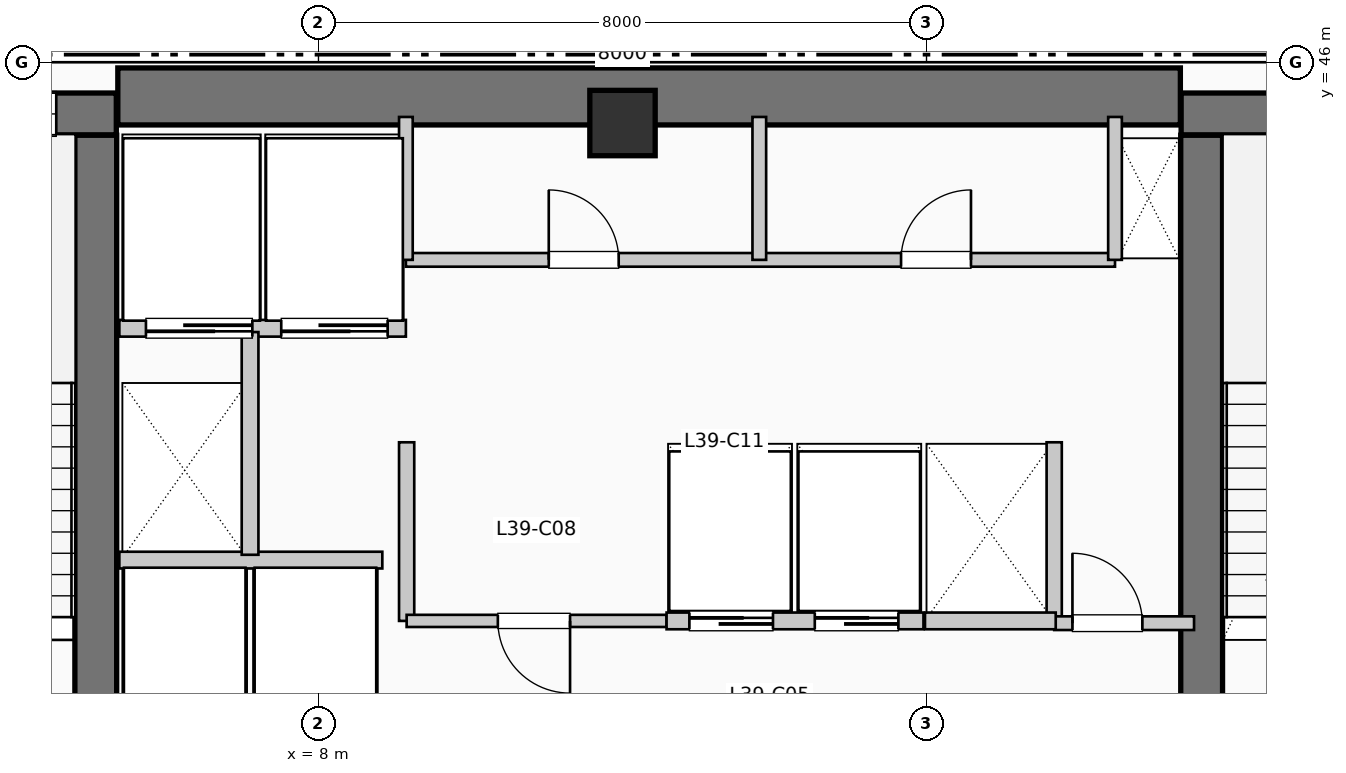
"""IFC4 building model, lengths in metres.
Left out: names, types, materials, properties, quantities, classifications, styles, units other than length and angle.
Written with IfcOpenShell. Run it as: python <this file> out.ifc"""

import sys

from ifc_helpers import new_model, si_unit, direction, frame, frame_2d, origin, origin_2d, place, context, subcontext, project, spatial, rectangle, extrude, element, fill, save


model = new_model("IFC4")
c1 = context("Model", 3, precision=1e-05, world=origin(), true_north=direction((0.0, 1.0)))
c2 = subcontext(c1, "Body", "Model", "MODEL_VIEW")
j1 = project(units=[si_unit("LENGTHUNIT", "METRE"), si_unit("PLANEANGLEUNIT", "RADIAN")], contexts=[c1])
p1 = place(None, origin())
s1 = spatial("IfcSite", under=j1, at=p1, CompositionType="ELEMENT")
p2 = place(p1, origin())
s2 = spatial("IfcBuilding", under=s1, at=p2, CompositionType="ELEMENT")
p3 = place(p2, frame((0.0, 0.0, 162.69)))
s3 = spatial("IfcBuildingStorey", under=s2, at=p3, CompositionType="ELEMENT", Elevation=162.69)
p4 = place(p3, frame((5.36, 45.55, 0.0), z_axis=(0.0, 0.0, 1.0), x_axis=(1.0, 0.0, 0.0)))
e1 = element("IfcWall", 1, at=p4, inside=s3, PredefinedType="SHEAR", context=c2, shape_type="SweptSolid", body=[
    extrude(rectangle(XDim=13.98, YDim=0.75, at=frame_2d((6.99, 0.0))), origin(), (0.0, 0.0, 1.0), 3.96),
])
p5 = place(p3, frame((5.07, 37.15, 0.0), z_axis=(0.0, 0.0, 1.0), x_axis=(0.0, 1.0, 0.0)))
e2 = element("IfcWall", 2, at=p5, inside=s3, PredefinedType="SHEAR", context=c2, shape_type="SweptSolid", body=[
    extrude(rectangle(XDim=7.89, YDim=0.55, at=frame_2d((3.945, 0.0))), origin(), (0.0, 0.0, 1.0), 3.96),
])
p6 = place(p3, frame((1.1, 45.32, 0.0), z_axis=(0.0, 0.0, 1.0), x_axis=(1.0, 0.0, 0.0)))
e3 = element("IfcWall", 3, at=p6, inside=s3, PredefinedType="SHEAR", context=c2, shape_type="SweptSolid", body=[
    extrude(rectangle(XDim=4.24, YDim=0.55, at=frame_2d((2.12, 0.0))), origin(), (0.0, 0.0, 1.0), 3.96),
])
p7 = place(p6, frame((2.05, 0.0, 1.05)))
e4 = element("IfcOpeningElement", 4, at=p7, cuts=e3, PredefinedType="OPENING", context=c2, shape_type="SweptSolid", body=[
    extrude(rectangle(XDim=1.4, YDim=1.8, at=frame_2d((0.7, 0.9))), frame((0.0, 0.285, 0.0), z_axis=(0.0, -1.0, 0.0), x_axis=(1.0, 0.0, 0.0)), (0.0, 0.0, 1.0), 0.57),
])
p8 = place(p3, frame((19.62, 37.15, 0.0), z_axis=(0.0, 0.0, 1.0), x_axis=(0.0, 1.0, 0.0)))
e5 = element("IfcWall", 5, at=p8, inside=s3, PredefinedType="SHEAR", context=c2, shape_type="SweptSolid", body=[
    extrude(rectangle(XDim=7.89, YDim=0.55, at=frame_2d((3.945, 0.0))), origin(), (0.0, 0.0, 1.0), 3.96),
])
p9 = place(p3, frame((19.35, 45.32, 0.0), z_axis=(0.0, 0.0, 1.0), x_axis=(1.0, 0.0, 0.0)))
e6 = element("IfcWall", 6, at=p9, inside=s3, PredefinedType="SHEAR", context=c2, shape_type="SweptSolid", body=[
    extrude(rectangle(XDim=3.69, YDim=0.55, at=frame_2d((1.845, 0.0))), origin(), (0.0, 0.0, 1.0), 3.96),
])
p10 = place(p9, frame((1.15, 0.0, 1.05)))
e7 = element("IfcOpeningElement", 7, at=p10, cuts=e6, PredefinedType="OPENING", context=c2, shape_type="SweptSolid", body=[
    extrude(rectangle(XDim=1.4, YDim=1.8, at=frame_2d((0.7, 0.9))), frame((0.0, 0.285, 0.0), z_axis=(0.0, -1.0, 0.0), x_axis=(1.0, 0.0, 0.0)), (0.0, 0.0, 1.0), 0.57),
])
p11 = place(p3, frame((12.0, 45.2, 0.0), z_axis=(0.0, 0.0, 1.0), x_axis=(1.0, 0.0, 0.0)))
e8 = element("IfcColumn", 8, at=p11, inside=s3, PredefinedType="COLUMN", context=c2, shape_type="SweptSolid", body=[
    extrude(rectangle(XDim=0.86, YDim=0.86, at=origin_2d()), origin(), (0.0, 0.0, 1.0), 3.96),
])
p12 = place(p3, frame((5.38, 39.45, 0.0), z_axis=(0.0, 0.0, 1.0), x_axis=(1.0, 0.0, 0.0)))
e9 = element("IfcWall", 9, at=p12, inside=s3, PredefinedType="PARTITIONING", context=c2, shape_type="SweptSolid", body=[
    extrude(rectangle(XDim=3.46, YDim=0.22, at=frame_2d((1.73, 0.0))), origin(), (0.0, 0.0, 1.0), 3.71),
])
p13 = place(p3, frame((5.38, 42.5, 0.0), z_axis=(0.0, 0.0, 1.0), x_axis=(1.0, 0.0, 0.0)))
e10 = element("IfcWall", 10, at=p13, inside=s3, PredefinedType="PARTITIONING", context=c2, shape_type="SweptSolid", body=[
    extrude(rectangle(XDim=3.77, YDim=0.22, at=frame_2d((1.885, 0.0))), origin(), (0.0, 0.0, 1.0), 3.71),
])
p14 = place(p13, frame((1.75, 0.0, 0.0), z_axis=(0.0, 0.0, 1.0), x_axis=(-1.0, 0.0, 0.0)))
e11 = element("IfcOpeningElement", 11, at=p14, cuts=e10, PredefinedType="OPENING", context=c2, shape_type="SweptSolid", body=[
    extrude(rectangle(XDim=1.4, YDim=2.2, at=frame_2d((0.7, 1.1))), frame((0.0, 0.12, 0.0), z_axis=(0.0, -1.0, 0.0), x_axis=(1.0, 0.0, 0.0)), (0.0, 0.0, 1.0), 0.24),
])
p15 = place(p13, frame((3.53, 0.0, 0.0), z_axis=(0.0, 0.0, 1.0), x_axis=(-1.0, 0.0, 0.0)))
e12 = element("IfcOpeningElement", 12, at=p15, cuts=e10, PredefinedType="OPENING", context=c2, shape_type="SweptSolid", body=[
    extrude(rectangle(XDim=1.4, YDim=2.2, at=frame_2d((0.7, 1.1))), frame((0.0, 0.12, 0.0), z_axis=(0.0, -1.0, 0.0), x_axis=(1.0, 0.0, 0.0)), (0.0, 0.0, 1.0), 0.24),
])
p16 = place(p3, frame((7.1, 39.52, 0.0), z_axis=(0.0, 0.0, 1.0), x_axis=(0.0, 1.0, 0.0)))
e13 = element("IfcWall", 13, at=p16, inside=s3, PredefinedType="PARTITIONING", context=c2, shape_type="SweptSolid", body=[
    extrude(rectangle(XDim=2.93, YDim=0.22, at=frame_2d((1.465, 0.0))), origin(), (0.0, 0.0, 1.0), 3.71),
])
for number, where, z_axis, x_axis in (
    (14, (9.16, 38.65, 0.0), (0.0, 0.0, 1.0), (0.0, 1.0, 0.0)),
    (15, (17.68, 38.65, 0.0), (0.0, 0.0, 1.0), (0.0, 1.0, 0.0)),
):
    element("IfcWall", number, at=place(p3, frame(where, z_axis=z_axis, x_axis=x_axis)), inside=s3, PredefinedType="PARTITIONING", context=c2, shape_type="SweptSolid", body=[
        extrude(rectangle(XDim=2.35, YDim=0.2, at=frame_2d((1.175, 0.0))), origin(), (0.0, 0.0, 1.0), 3.71),
    ])
p17 = place(p3, frame((17.68, 38.62, 0.0), z_axis=(0.0, 0.0, 1.0), x_axis=(1.0, 0.0, 0.0)))
e16 = element("IfcWall", 16, at=p17, inside=s3, PredefinedType="PARTITIONING", context=c2, shape_type="SweptSolid", body=[
    extrude(rectangle(XDim=1.84, YDim=0.18, at=frame_2d((0.92, 0.0))), origin(), (0.0, 0.0, 1.0), 3.71),
])
p18 = place(p17, frame((0.24, 0.0, 0.0)))
e17 = element("IfcOpeningElement", 17, at=p18, cuts=e16, PredefinedType="OPENING", context=c2, shape_type="SweptSolid", body=[
    extrude(rectangle(XDim=0.92, YDim=2.1, at=frame_2d((0.46, 1.05))), frame((0.0, 0.1, 0.0), z_axis=(0.0, -1.0, 0.0), x_axis=(1.0, 0.0, 0.0)), (0.0, 0.0, 1.0), 0.2),
])
p19 = place(p3, frame((9.16, 38.65, 0.0), z_axis=(0.0, 0.0, 1.0), x_axis=(1.0, 0.0, 0.0)))
e18 = element("IfcWall", 18, at=p19, inside=s3, PredefinedType="PARTITIONING", context=c2, shape_type="SweptSolid", body=[
    extrude(rectangle(XDim=3.42, YDim=0.16, at=frame_2d((1.71, 0.0))), origin(), (0.0, 0.0, 1.0), 3.71),
])
p20 = place(p19, frame((2.15, 0.0, 0.0), z_axis=(0.0, 0.0, 1.0), x_axis=(-1.0, 0.0, 0.0)))
e19 = element("IfcOpeningElement", 19, at=p20, cuts=e18, PredefinedType="OPENING", context=c2, shape_type="SweptSolid", body=[
    extrude(rectangle(XDim=0.95, YDim=2.15, at=frame_2d((0.475, 1.075))), frame((0.0, 0.09, 0.0), z_axis=(0.0, -1.0, 0.0), x_axis=(1.0, 0.0, 0.0)), (0.0, 0.0, 1.0), 0.18),
])
p21 = place(p3, frame((12.58, 38.65, 0.0), z_axis=(0.0, 0.0, 1.0), x_axis=(1.0, 0.0, 0.0)))
e20 = element("IfcWall", 20, at=p21, inside=s3, PredefinedType="PARTITIONING", context=c2, shape_type="SweptSolid", body=[
    extrude(rectangle(XDim=3.38, YDim=0.22, at=frame_2d((1.69, 0.0))), origin(), (0.0, 0.0, 1.0), 3.71),
])
p22 = place(p21, frame((0.3, 0.0, 0.0)))
e21 = element("IfcOpeningElement", 21, at=p22, cuts=e20, PredefinedType="OPENING", context=c2, shape_type="SweptSolid", body=[
    extrude(rectangle(XDim=1.1, YDim=2.2, at=frame_2d((0.55, 1.1))), frame((0.0, 0.12, 0.0), z_axis=(0.0, -1.0, 0.0), x_axis=(1.0, 0.0, 0.0)), (0.0, 0.0, 1.0), 0.24),
])
p23 = place(p21, frame((1.95, 0.0, 0.0)))
e22 = element("IfcOpeningElement", 22, at=p23, cuts=e20, PredefinedType="OPENING", context=c2, shape_type="SweptSolid", body=[
    extrude(rectangle(XDim=1.1, YDim=2.2, at=frame_2d((0.55, 1.1))), frame((0.0, 0.12, 0.0), z_axis=(0.0, -1.0, 0.0), x_axis=(1.0, 0.0, 0.0)), (0.0, 0.0, 1.0), 0.24),
])
p24 = place(p3, frame((15.98, 38.65, 0.0), z_axis=(0.0, 0.0, 1.0), x_axis=(1.0, 0.0, 0.0)))
e23 = element("IfcWall", 23, at=p24, inside=s3, PredefinedType="PARTITIONING", context=c2, shape_type="SweptSolid", body=[
    extrude(rectangle(XDim=1.72, YDim=0.22, at=frame_2d((0.86, 0.0))), origin(), (0.0, 0.0, 1.0), 3.71),
])
p25 = place(p3, frame((9.15, 43.4, 0.0), z_axis=(0.0, 0.0, 1.0), x_axis=(1.0, 0.0, 0.0)))
e24 = element("IfcWall", 24, at=p25, inside=s3, PredefinedType="PLUMBINGWALL", context=c2, shape_type="SweptSolid", body=[
    extrude(rectangle(XDim=9.33, YDim=0.18, at=frame_2d((4.665, 0.0))), origin(), (0.0, 0.0, 1.0), 3.71),
])
p26 = place(p25, frame((1.88, 0.0, 0.0)))
e25 = element("IfcOpeningElement", 25, at=p26, cuts=e24, PredefinedType="OPENING", context=c2, shape_type="SweptSolid", body=[
    extrude(rectangle(XDim=0.92, YDim=2.1, at=frame_2d((0.46, 1.05))), frame((0.0, 0.1, 0.0), z_axis=(0.0, -1.0, 0.0), x_axis=(1.0, 0.0, 0.0)), (0.0, 0.0, 1.0), 0.2),
])
p27 = place(p25, frame((6.515, 0.0, 0.0)))
e26 = element("IfcOpeningElement", 26, at=p27, cuts=e24, PredefinedType="OPENING", context=c2, shape_type="SweptSolid", body=[
    extrude(rectangle(XDim=0.92, YDim=2.1, at=frame_2d((0.46, 1.05))), frame((0.0, 0.1, 0.0), z_axis=(0.0, -1.0, 0.0), x_axis=(1.0, 0.0, 0.0)), (0.0, 0.0, 1.0), 0.2),
])
for number, where, z_axis, x_axis in (
    (27, (9.15, 43.4, 0.0), (0.0, 0.0, 1.0), (0.0, 1.0, 0.0)),
    (28, (18.48, 43.4, 0.0), (0.0, 0.0, 1.0), (0.0, 1.0, 0.0)),
    (29, (13.8, 43.4, 0.0), (0.0, 0.0, 1.0), (0.0, 1.0, 0.0)),
):
    element("IfcWall", number, at=place(p3, frame(where, z_axis=z_axis, x_axis=x_axis)), inside=s3, PredefinedType="PLUMBINGWALL", context=c2, shape_type="SweptSolid", body=[
        extrude(rectangle(XDim=1.88, YDim=0.18, at=frame_2d((0.94, 0.0))), origin(), (0.0, 0.0, 1.0), 3.71),
    ])
p28 = place(p7, origin())
e30 = element("IfcWindow", 30, at=p28, inside=s3, PartitioningType="SINGLE_PANEL", PredefinedType="WINDOW", context=c2, shape_type="SweptSolid", body=[
    extrude(rectangle(XDim=1.4, YDim=1.8, at=frame_2d((0.7, 0.9))), frame((0.0, 0.03, 0.0), z_axis=(0.0, -1.0, 0.0), x_axis=(1.0, 0.0, 0.0)), (0.0, 0.0, 1.0), 0.06),
])
fill(e4, e30)
p29 = place(p14, origin())
e31 = element("IfcDoor", 31, at=p29, inside=s3, OperationType="SLIDING_TO_LEFT", PredefinedType="DOOR", context=c2, shape_type="SweptSolid", body=[
    extrude(rectangle(XDim=1.4, YDim=2.2, at=frame_2d((0.7, 1.1))), frame((0.0, 0.025, 0.0), z_axis=(0.0, -1.0, 0.0), x_axis=(1.0, 0.0, 0.0)), (0.0, 0.0, 1.0), 0.05),
])
fill(e11, e31)
p30 = place(p15, origin())
e32 = element("IfcDoor", 32, at=p30, inside=s3, OperationType="SLIDING_TO_LEFT", PredefinedType="DOOR", context=c2, shape_type="SweptSolid", body=[
    extrude(rectangle(XDim=1.4, YDim=2.2, at=frame_2d((0.7, 1.1))), frame((0.0, 0.025, 0.0), z_axis=(0.0, -1.0, 0.0), x_axis=(1.0, 0.0, 0.0)), (0.0, 0.0, 1.0), 0.05),
])
fill(e12, e32)
p31 = place(p18, origin())
e33 = element("IfcDoor", 33, at=p31, inside=s3, OperationType="SINGLE_SWING_LEFT", PredefinedType="DOOR", context=c2, shape_type="SweptSolid", body=[
    extrude(rectangle(XDim=0.92, YDim=2.1, at=frame_2d((0.46, 1.05))), frame((0.0, 0.025, 0.0), z_axis=(0.0, -1.0, 0.0), x_axis=(1.0, 0.0, 0.0)), (0.0, 0.0, 1.0), 0.05),
])
fill(e17, e33)
p32 = place(p20, origin())
e34 = element("IfcDoor", 34, at=p32, inside=s3, OperationType="SINGLE_SWING_RIGHT", PredefinedType="DOOR", context=c2, shape_type="SweptSolid", body=[
    extrude(rectangle(XDim=0.95, YDim=2.15, at=frame_2d((0.475, 1.075))), frame((0.0, 0.025, 0.0), z_axis=(0.0, -1.0, 0.0), x_axis=(1.0, 0.0, 0.0)), (0.0, 0.0, 1.0), 0.05),
])
fill(e19, e34)
p33 = place(p22, origin())
e35 = element("IfcDoor", 35, at=p33, inside=s3, OperationType="SLIDING_TO_RIGHT", PredefinedType="DOOR", context=c2, shape_type="SweptSolid", body=[
    extrude(rectangle(XDim=1.1, YDim=2.2, at=frame_2d((0.55, 1.1))), frame((0.0, 0.025, 0.0), z_axis=(0.0, -1.0, 0.0), x_axis=(1.0, 0.0, 0.0)), (0.0, 0.0, 1.0), 0.05),
])
fill(e21, e35)
p34 = place(p23, origin())
e36 = element("IfcDoor", 36, at=p34, inside=s3, OperationType="SLIDING_TO_RIGHT", PredefinedType="DOOR", context=c2, shape_type="SweptSolid", body=[
    extrude(rectangle(XDim=1.1, YDim=2.2, at=frame_2d((0.55, 1.1))), frame((0.0, 0.025, 0.0), z_axis=(0.0, -1.0, 0.0), x_axis=(1.0, 0.0, 0.0)), (0.0, 0.0, 1.0), 0.05),
])
fill(e22, e36)
p35 = place(p26, origin())
e37 = element("IfcDoor", 37, at=p35, inside=s3, OperationType="SINGLE_SWING_LEFT", PredefinedType="DOOR", context=c2, shape_type="SweptSolid", body=[
    extrude(rectangle(XDim=0.92, YDim=2.1, at=frame_2d((0.46, 1.05))), frame((0.0, 0.025, 0.0), z_axis=(0.0, -1.0, 0.0), x_axis=(1.0, 0.0, 0.0)), (0.0, 0.0, 1.0), 0.05),
])
fill(e25, e37)
p36 = place(p27, origin())
e38 = element("IfcDoor", 38, at=p36, inside=s3, OperationType="SINGLE_SWING_RIGHT", PredefinedType="DOOR", context=c2, shape_type="SweptSolid", body=[
    extrude(rectangle(XDim=0.92, YDim=2.1, at=frame_2d((0.46, 1.05))), frame((0.0, 0.025, 0.0), z_axis=(0.0, -1.0, 0.0), x_axis=(1.0, 0.0, 0.0)), (0.0, 0.0, 1.0), 0.05),
])
fill(e26, e38)
save(model, sys.argv[1])
